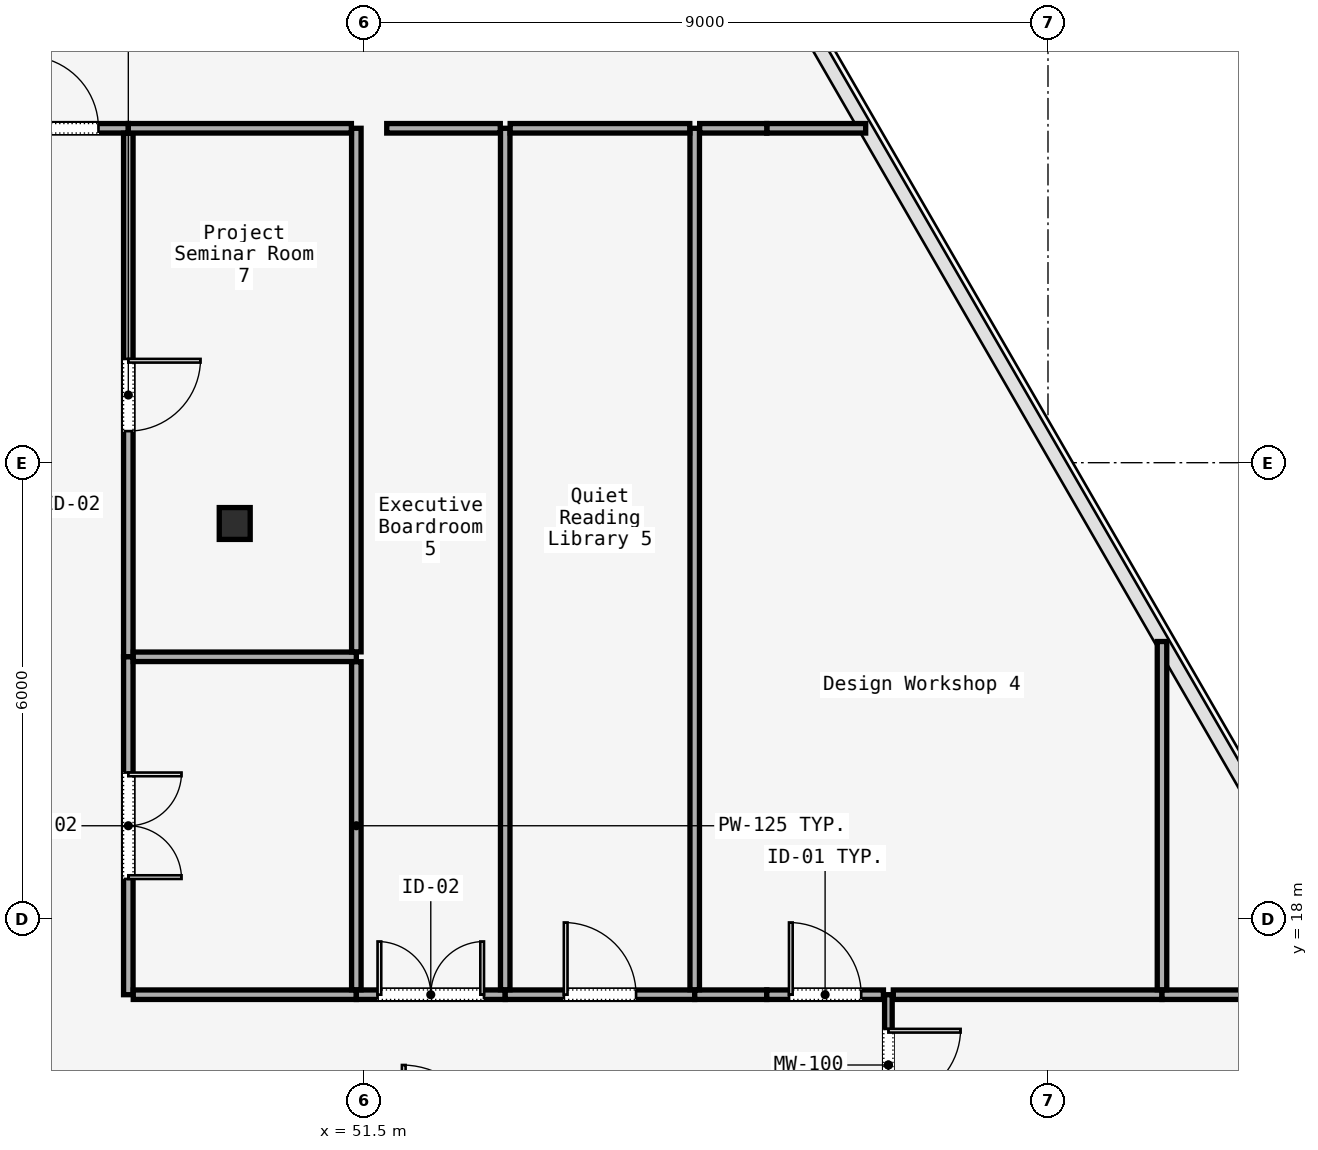
"""IFC4 building model, lengths in metres.
Left out: names, types, materials, properties, quantities, classifications, styles, units other than length and angle.
Written with IfcOpenShell. Run it as: python <this file> out.ifc"""

import sys

from ifc_helpers import new_model, si_unit, direction, frame, frame_2d, origin, origin_2d, place, context, subcontext, project, spatial, rectangle, i_section, extrude, element, fill, save


model = new_model("IFC4")
c1 = context("Model", 3, precision=1e-05, world=origin(), true_north=direction((0.0, 1.0)))
c2 = subcontext(c1, "Body", "Model", "MODEL_VIEW")
j1 = project(units=[si_unit("LENGTHUNIT", "METRE"), si_unit("PLANEANGLEUNIT", "RADIAN")], contexts=[c1])
p1 = place(None, origin())
s1 = spatial("IfcSite", under=j1, at=p1, CompositionType="ELEMENT")
p2 = place(p1, origin())
s2 = spatial("IfcBuilding", under=s1, at=p2, CompositionType="ELEMENT")
p3 = place(p2, frame((0.0, 0.0, 138.4)))
s3 = spatial("IfcBuildingStorey", under=s2, at=p3, CompositionType="ELEMENT", Elevation=138.4)
p4 = place(p3, frame((49.8, 23.2, 0.0), z_axis=(0.0, 0.0, 1.0), x_axis=(1.0, 0.0, 0.0)))
e1 = element("IfcColumn", 1, at=p4, inside=s3, PredefinedType="COLUMN", context=c2, shape_type="SweptSolid", body=[
    extrude(i_section(OverallWidth=0.407, OverallDepth=0.419, WebThickness=0.031, FlangeThickness=0.049, FilletRadius=0.015, at=origin_2d()), origin(), (0.0, 0.0, 1.0), 3.58),
])
p5 = place(p3, frame((58.4, 17.0, 0.0), z_axis=(0.0, 0.0, 1.0), x_axis=(0.0, -1.0, 0.0)))
e2 = element("IfcWall", 2, at=p5, inside=s3, PredefinedType="MOVABLE", context=c2, shape_type="SweptSolid", body=[
    extrude(rectangle(XDim=1.85, YDim=0.1, at=frame_2d((0.925, 0.0))), origin(), (0.0, 0.0, 1.0), 3.01),
])
p6 = place(p5, frame((0.45, 0.0, 0.0)))
e3 = element("IfcOpeningElement", 3, at=p6, cuts=e2, PredefinedType="OPENING", context=c2, shape_type="SweptSolid", body=[
    extrude(rectangle(XDim=0.95, YDim=2.2, at=frame_2d((0.475, 1.1))), frame((0.0, 0.05, 0.0), z_axis=(0.0, -1.0, 0.0), x_axis=(1.0, 0.0, 0.0)), (0.0, 0.0, 1.0), 0.1),
])
p7 = place(p3, frame((46.665, 28.4, 0.0), z_axis=(0.0, 0.0, 1.0), x_axis=(1.0, 0.0, 0.0)))
e4 = element("IfcWall", 4, at=p7, inside=s3, PredefinedType="PARTITIONING", context=c2, shape_type="SweptSolid", body=[
    extrude(rectangle(XDim=1.735, YDim=0.125, at=frame_2d((0.867, 0.0))), origin(), (0.0, 0.0, 1.0), 3.01),
])
p8 = place(p7, frame((0.393, 0.0, 0.0)))
e5 = element("IfcOpeningElement", 5, at=p8, cuts=e4, PredefinedType="OPENING", context=c2, shape_type="SweptSolid", body=[
    extrude(rectangle(XDim=0.95, YDim=2.2, at=frame_2d((0.475, 1.1))), frame((0.0, 0.062, 0.0), z_axis=(0.0, -1.0, 0.0), x_axis=(1.0, 0.0, 0.0)), (0.0, 0.0, 1.0), 0.125),
])
p9 = place(p3, frame((48.4, 28.335, 0.0), z_axis=(0.0, 0.0, 1.0), x_axis=(0.0, -1.0, 0.0)))
e6 = element("IfcWall", 6, at=p9, inside=s3, PredefinedType="PARTITIONING", context=c2, shape_type="SweptSolid", body=[
    extrude(rectangle(XDim=6.889, YDim=0.125, at=frame_2d((3.444, 0.0))), origin(), (0.0, 0.0, 1.0), 3.01),
])
p10 = place(p9, frame((2.969, 0.0, 0.0)))
e7 = element("IfcOpeningElement", 7, at=p10, cuts=e6, PredefinedType="OPENING", context=c2, shape_type="SweptSolid", body=[
    extrude(rectangle(XDim=0.95, YDim=2.2, at=frame_2d((0.475, 1.1))), frame((0.0, 0.062, 0.0), z_axis=(0.0, -1.0, 0.0), x_axis=(1.0, 0.0, 0.0)), (0.0, 0.0, 1.0), 0.125),
])
p11 = place(p3, frame((48.4, 21.446, 0.0), z_axis=(0.0, 0.0, 1.0), x_axis=(0.0, -1.0, 0.0)))
e8 = element("IfcWall", 8, at=p11, inside=s3, PredefinedType="PARTITIONING", context=c2, shape_type="SweptSolid", body=[
    extrude(rectangle(XDim=4.446, YDim=0.125, at=frame_2d((2.223, 0.0))), origin(), (0.0, 0.0, 1.0), 3.01),
])
p12 = place(p11, frame((1.523, 0.0, 0.0)))
e9 = element("IfcOpeningElement", 9, at=p12, cuts=e8, PredefinedType="OPENING", context=c2, shape_type="SweptSolid", body=[
    extrude(rectangle(XDim=1.4, YDim=2.2, at=frame_2d((0.7, 1.1))), frame((0.0, 0.062, 0.0), z_axis=(0.0, -1.0, 0.0), x_axis=(1.0, 0.0, 0.0)), (0.0, 0.0, 1.0), 0.125),
])
p13 = place(p3, frame((48.465, 17.0, 0.0), z_axis=(0.0, 0.0, 1.0), x_axis=(1.0, 0.0, 0.0)))
e10 = element("IfcWall", 10, at=p13, inside=s3, PredefinedType="PARTITIONING", context=c2, shape_type="SweptSolid", body=[
    extrude(rectangle(XDim=2.935, YDim=0.125, at=frame_2d((1.467, 0.0))), origin(), (0.0, 0.0, 1.0), 3.01),
])
p14 = place(p3, frame((51.4, 17.0, 0.0), z_axis=(0.0, 0.0, 1.0), x_axis=(1.0, 0.0, 0.0)))
e11 = element("IfcWall", 11, at=p14, inside=s3, PredefinedType="PARTITIONING", context=c2, shape_type="SweptSolid", body=[
    extrude(rectangle(XDim=1.959, YDim=0.125, at=frame_2d((0.979, 0.0))), origin(), (0.0, 0.0, 1.0), 3.01),
])
p15 = place(p14, frame((0.279, 0.0, 0.0)))
e12 = element("IfcOpeningElement", 12, at=p15, cuts=e11, PredefinedType="OPENING", context=c2, shape_type="SweptSolid", body=[
    extrude(rectangle(XDim=1.4, YDim=2.2, at=frame_2d((0.7, 1.1))), frame((0.0, 0.062, 0.0), z_axis=(0.0, -1.0, 0.0), x_axis=(1.0, 0.0, 0.0)), (0.0, 0.0, 1.0), 0.125),
])
p16 = place(p3, frame((53.359, 17.0, 0.0), z_axis=(0.0, 0.0, 1.0), x_axis=(1.0, 0.0, 0.0)))
e13 = element("IfcWall", 13, at=p16, inside=s3, PredefinedType="PARTITIONING", context=c2, shape_type="SweptSolid", body=[
    extrude(rectangle(XDim=2.493, YDim=0.125, at=frame_2d((1.247, 0.0))), origin(), (0.0, 0.0, 1.0), 3.01),
])
p17 = place(p16, frame((0.771, 0.0, 0.0)))
e14 = element("IfcOpeningElement", 14, at=p17, cuts=e13, PredefinedType="OPENING", context=c2, shape_type="SweptSolid", body=[
    extrude(rectangle(XDim=0.95, YDim=2.2, at=frame_2d((0.475, 1.1))), frame((0.0, 0.062, 0.0), z_axis=(0.0, -1.0, 0.0), x_axis=(1.0, 0.0, 0.0)), (0.0, 0.0, 1.0), 0.125),
])
p18 = place(p3, frame((55.852, 17.0, 0.0), z_axis=(0.0, 0.0, 1.0), x_axis=(1.0, 0.0, 0.0)))
e15 = element("IfcWall", 15, at=p18, inside=s3, PredefinedType="PARTITIONING", context=c2, shape_type="SweptSolid", body=[
    extrude(rectangle(XDim=0.948, YDim=0.125, at=frame_2d((0.474, 0.0))), origin(), (0.0, 0.0, 1.0), 3.01),
])
p19 = place(p3, frame((56.8, 17.0, 0.0), z_axis=(0.0, 0.0, 1.0), x_axis=(1.0, 0.0, 0.0)))
e16 = element("IfcWall", 16, at=p19, inside=s3, PredefinedType="PARTITIONING", context=c2, shape_type="SweptSolid", body=[
    extrude(rectangle(XDim=1.535, YDim=0.125, at=frame_2d((0.768, 0.0))), origin(), (0.0, 0.0, 1.0), 3.01),
])
p20 = place(p19, frame((0.292, 0.0, 0.0)))
e17 = element("IfcOpeningElement", 17, at=p20, cuts=e16, PredefinedType="OPENING", context=c2, shape_type="SweptSolid", body=[
    extrude(rectangle(XDim=0.95, YDim=2.2, at=frame_2d((0.475, 1.1))), frame((0.0, 0.062, 0.0), z_axis=(0.0, -1.0, 0.0), x_axis=(1.0, 0.0, 0.0)), (0.0, 0.0, 1.0), 0.125),
])
p21 = place(p3, frame((58.465, 17.0, 0.0), z_axis=(0.0, 0.0, 1.0), x_axis=(1.0, 0.0, 0.0)))
e18 = element("IfcWall", 18, at=p21, inside=s3, PredefinedType="PARTITIONING", context=c2, shape_type="SweptSolid", body=[
    extrude(rectangle(XDim=3.535, YDim=0.125, at=frame_2d((1.768, 0.0))), origin(), (0.0, 0.0, 1.0), 3.01),
])
p22 = place(p3, frame((62.0, 17.0, 0.0), z_axis=(0.0, 0.0, 1.0), x_axis=(1.0, 0.0, 0.0)))
e19 = element("IfcWall", 19, at=p22, inside=s3, PredefinedType="PARTITIONING", context=c2, shape_type="SweptSolid", body=[
    extrude(rectangle(XDim=2.683, YDim=0.125, at=frame_2d((1.342, 0.0))), origin(), (0.0, 0.0, 1.0), 3.01),
])
p23 = place(p3, frame((48.465, 21.446, 0.0), z_axis=(0.0, 0.0, 1.0), x_axis=(1.0, 0.0, 0.0)))
e20 = element("IfcWall", 20, at=p23, inside=s3, PredefinedType="PARTITIONING", context=c2, shape_type="SweptSolid", body=[
    extrude(rectangle(XDim=2.935, YDim=0.125, at=frame_2d((1.467, 0.0))), origin(), (0.0, 0.0, 1.0), 3.01),
])
p24 = place(p3, frame((51.4, 21.381, 0.0), z_axis=(0.0, 0.0, 1.0), x_axis=(0.0, -1.0, 0.0)))
e21 = element("IfcWall", 21, at=p24, inside=s3, PredefinedType="PARTITIONING", context=c2, shape_type="SweptSolid", body=[
    extrude(rectangle(XDim=4.316, YDim=0.125, at=frame_2d((2.158, 0.0))), origin(), (0.0, 0.0, 1.0), 3.01),
])
p25 = place(p3, frame((56.8, 28.4, 0.0), z_axis=(0.0, 0.0, 1.0), x_axis=(1.0, 0.0, 0.0)))
e22 = element("IfcWall", 22, at=p25, inside=s3, PredefinedType="PARTITIONING", context=c2, shape_type="SweptSolid", body=[
    extrude(rectangle(XDim=1.301, YDim=0.125, at=frame_2d((0.651, 0.0))), origin(), (0.0, 0.0, 1.0), 3.01),
])
p26 = place(p3, frame((62.0, 21.647, 0.0), z_axis=(0.0, 0.0, 1.0), x_axis=(0.0, -1.0, 0.0)))
e23 = element("IfcWall", 23, at=p26, inside=s3, PredefinedType="PARTITIONING", context=c2, shape_type="SweptSolid", body=[
    extrude(rectangle(XDim=4.582, YDim=0.125, at=frame_2d((2.291, 0.0))), origin(), (0.0, 0.0, 1.0), 3.01),
])
p27 = place(p3, frame((55.852, 17.065, 0.0), z_axis=(0.0, 0.0, 1.0), x_axis=(0.0, 1.0, 0.0)))
e24 = element("IfcWall", 24, at=p27, inside=s3, PredefinedType="PARTITIONING", context=c2, shape_type="SweptSolid", body=[
    extrude(rectangle(XDim=11.335, YDim=0.125, at=frame_2d((5.667, 0.0))), origin(), (0.0, 0.0, 1.0), 3.01),
])
p28 = place(p3, frame((55.917, 28.4, 0.0), z_axis=(0.0, 0.0, 1.0), x_axis=(1.0, 0.0, 0.0)))
e25 = element("IfcWall", 25, at=p28, inside=s3, PredefinedType="PARTITIONING", context=c2, shape_type="SweptSolid", body=[
    extrude(rectangle(XDim=0.883, YDim=0.125, at=frame_2d((0.441, 0.0))), origin(), (0.0, 0.0, 1.0), 3.01),
])
p29 = place(p3, frame((53.359, 28.4, 0.0), z_axis=(0.0, 0.0, 1.0), x_axis=(0.0, -1.0, 0.0)))
e26 = element("IfcWall", 26, at=p29, inside=s3, PredefinedType="PARTITIONING", context=c2, shape_type="SweptSolid", body=[
    extrude(rectangle(XDim=11.335, YDim=0.125, at=frame_2d((5.667, 0.0))), origin(), (0.0, 0.0, 1.0), 3.01),
])
p30 = place(p3, frame((51.4, 21.511, 0.0), z_axis=(0.0, 0.0, 1.0), x_axis=(0.0, 1.0, 0.0)))
e27 = element("IfcWall", 27, at=p30, inside=s3, PredefinedType="PARTITIONING", context=c2, shape_type="SweptSolid", body=[
    extrude(rectangle(XDim=6.889, YDim=0.125, at=frame_2d((3.444, 0.0))), origin(), (0.0, 0.0, 1.0), 3.01),
])
p31 = place(p3, frame((51.8, 28.4, 0.0), z_axis=(0.0, 0.0, 1.0), x_axis=(1.0, 0.0, 0.0)))
e28 = element("IfcWall", 28, at=p31, inside=s3, PredefinedType="PARTITIONING", context=c2, shape_type="SweptSolid", body=[
    extrude(rectangle(XDim=1.494, YDim=0.125, at=frame_2d((0.747, 0.0))), origin(), (0.0, 0.0, 1.0), 3.01),
])
p32 = place(p3, frame((53.424, 28.4, 0.0), z_axis=(0.0, 0.0, 1.0), x_axis=(1.0, 0.0, 0.0)))
e29 = element("IfcWall", 29, at=p32, inside=s3, PredefinedType="PARTITIONING", context=c2, shape_type="SweptSolid", body=[
    extrude(rectangle(XDim=2.363, YDim=0.125, at=frame_2d((1.182, 0.0))), origin(), (0.0, 0.0, 1.0), 3.01),
])
p33 = place(p3, frame((48.4, 28.4, 0.0), z_axis=(0.0, 0.0, 1.0), x_axis=(1.0, 0.0, 0.0)))
e30 = element("IfcWall", 30, at=p33, inside=s3, PredefinedType="PARTITIONING", context=c2, shape_type="SweptSolid", body=[
    extrude(rectangle(XDim=2.935, YDim=0.125, at=frame_2d((1.468, 0.0))), origin(), (0.0, 0.0, 1.0), 3.01),
])
p34 = place(p6, origin())
e31 = element("IfcDoor", 31, at=p34, inside=s3, OperationType="SINGLE_SWING_RIGHT", PredefinedType="DOOR", context=c2, shape_type="SweptSolid", body=[
    extrude(rectangle(XDim=0.95, YDim=2.2, at=frame_2d((0.475, 1.1))), frame((0.0, 0.025, 0.0), z_axis=(0.0, -1.0, 0.0), x_axis=(1.0, 0.0, 0.0)), (0.0, 0.0, 1.0), 0.05),
])
fill(e3, e31)
p35 = place(p12, origin())
e32 = element("IfcDoor", 32, at=p35, inside=s3, OperationType="SINGLE_SWING_RIGHT", PredefinedType="DOOR", context=c2, shape_type="SweptSolid", body=[
    extrude(rectangle(XDim=1.4, YDim=2.2, at=frame_2d((0.7, 1.1))), frame((0.0, 0.025, 0.0), z_axis=(0.0, -1.0, 0.0), x_axis=(1.0, 0.0, 0.0)), (0.0, 0.0, 1.0), 0.05),
])
fill(e9, e32)
p36 = place(p20, origin())
e33 = element("IfcDoor", 33, at=p36, inside=s3, OperationType="SINGLE_SWING_RIGHT", PredefinedType="DOOR", context=c2, shape_type="SweptSolid", body=[
    extrude(rectangle(XDim=0.95, YDim=2.2, at=frame_2d((0.475, 1.1))), frame((0.0, 0.025, 0.0), z_axis=(0.0, -1.0, 0.0), x_axis=(1.0, 0.0, 0.0)), (0.0, 0.0, 1.0), 0.05),
])
fill(e17, e33)
p37 = place(p15, origin())
e34 = element("IfcDoor", 34, at=p37, inside=s3, OperationType="SINGLE_SWING_LEFT", PredefinedType="DOOR", context=c2, shape_type="SweptSolid", body=[
    extrude(rectangle(XDim=1.4, YDim=2.2, at=frame_2d((0.7, 1.1))), frame((0.0, 0.025, 0.0), z_axis=(0.0, -1.0, 0.0), x_axis=(1.0, 0.0, 0.0)), (0.0, 0.0, 1.0), 0.05),
])
fill(e12, e34)
p38 = place(p17, origin())
e35 = element("IfcDoor", 35, at=p38, inside=s3, OperationType="SINGLE_SWING_RIGHT", PredefinedType="DOOR", context=c2, shape_type="SweptSolid", body=[
    extrude(rectangle(XDim=0.95, YDim=2.2, at=frame_2d((0.475, 1.1))), frame((0.0, 0.025, 0.0), z_axis=(0.0, -1.0, 0.0), x_axis=(1.0, 0.0, 0.0)), (0.0, 0.0, 1.0), 0.05),
])
fill(e14, e35)
p39 = place(p10, origin())
e36 = element("IfcDoor", 36, at=p39, inside=s3, OperationType="SINGLE_SWING_RIGHT", PredefinedType="DOOR", context=c2, shape_type="SweptSolid", body=[
    extrude(rectangle(XDim=0.95, YDim=2.2, at=frame_2d((0.475, 1.1))), frame((0.0, 0.025, 0.0), z_axis=(0.0, -1.0, 0.0), x_axis=(1.0, 0.0, 0.0)), (0.0, 0.0, 1.0), 0.05),
])
fill(e7, e36)
p40 = place(p8, origin())
e37 = element("IfcDoor", 37, at=p40, inside=s3, OperationType="SINGLE_SWING_LEFT", PredefinedType="DOOR", context=c2, shape_type="SweptSolid", body=[
    extrude(rectangle(XDim=0.95, YDim=2.2, at=frame_2d((0.475, 1.1))), frame((0.0, 0.025, 0.0), z_axis=(0.0, -1.0, 0.0), x_axis=(1.0, 0.0, 0.0)), (0.0, 0.0, 1.0), 0.05),
])
fill(e5, e37)
save(model, sys.argv[1])
